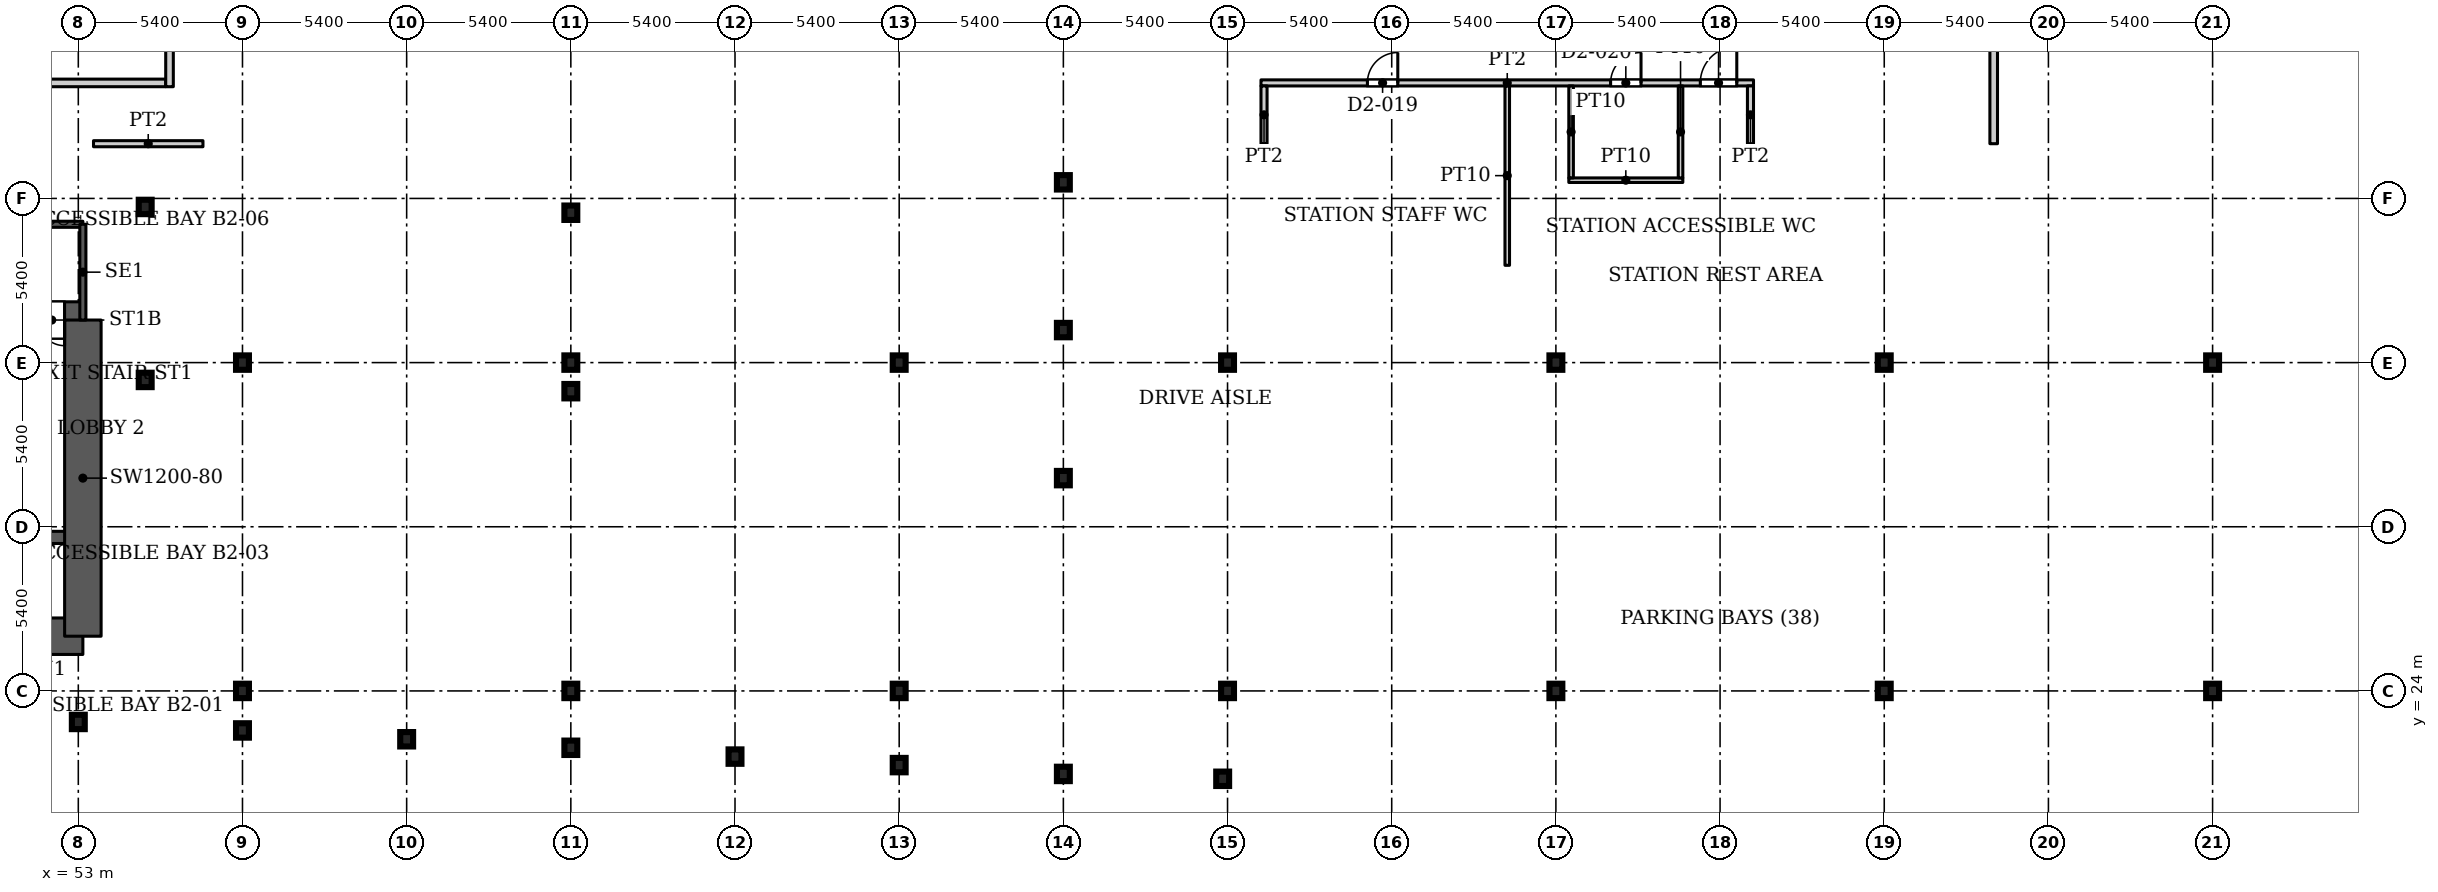
"""IFC4 building model, lengths in metres.
Left out: names, types, materials, properties, quantities, classifications, styles, units other than length and angle.
Written with IfcOpenShell. Run it as: python <this file> out.ifc"""

import sys

from ifc_helpers import new_model, si_unit, direction, frame, frame_2d, origin, origin_2d, place, context, subcontext, project, spatial, rectangle, i_section, extrude, source, transform, mapped, element, fill, save


model = new_model("IFC4")
c1 = context("Model", 3, precision=1e-05, world=origin(), true_north=direction((0.0, 1.0)))
c2 = subcontext(c1, "Body", "Model", "MODEL_VIEW")
j1 = project(units=[si_unit("LENGTHUNIT", "METRE"), si_unit("PLANEANGLEUNIT", "RADIAN")], contexts=[c1])
p1 = place(None, origin())
s1 = spatial("IfcSite", under=j1, at=p1, CompositionType="ELEMENT")
p2 = place(p1, origin())
s2 = spatial("IfcBuilding", under=s1, at=p2, CompositionType="ELEMENT")
p3 = place(p2, frame((0.0, 0.0, -10.0)))
s3 = spatial("IfcBuildingStorey", under=s2, at=p3, CompositionType="ELEMENT", Elevation=-10.0)
for number, where, z_axis, x_axis in (
    (1, (58.4, 24.0, 0.0), (0.0, 0.0, 1.0), (1.0, 0.0, 0.0)),
    (2, (69.2, 24.0, 0.0), (0.0, 0.0, 1.0), (1.0, 0.0, 0.0)),
    (3, (80.0, 24.0, 0.0), (0.0, 0.0, 1.0), (1.0, 0.0, 0.0)),
    (4, (90.8, 24.0, 0.0), (0.0, 0.0, 1.0), (1.0, 0.0, 0.0)),
    (5, (101.6, 24.0, 0.0), (0.0, 0.0, 1.0), (1.0, 0.0, 0.0)),
    (6, (112.4, 24.0, 0.0), (0.0, 0.0, 1.0), (1.0, 0.0, 0.0)),
    (7, (123.2, 24.0, 0.0), (0.0, 0.0, 1.0), (1.0, 0.0, 0.0)),
    (8, (58.4, 34.8, 0.0), (0.0, 0.0, 1.0), (1.0, 0.0, 0.0)),
    (9, (69.2, 34.8, 0.0), (0.0, 0.0, 1.0), (1.0, 0.0, 0.0)),
    (10, (80.0, 34.8, 0.0), (0.0, 0.0, 1.0), (1.0, 0.0, 0.0)),
    (11, (90.8, 34.8, 0.0), (0.0, 0.0, 1.0), (1.0, 0.0, 0.0)),
    (12, (101.6, 34.8, 0.0), (0.0, 0.0, 1.0), (1.0, 0.0, 0.0)),
    (13, (112.4, 34.8, 0.0), (0.0, 0.0, 1.0), (1.0, 0.0, 0.0)),
    (14, (123.2, 34.8, 0.0), (0.0, 0.0, 1.0), (1.0, 0.0, 0.0)),
    (15, (90.64, 21.11, 0.0), (0.0, 0.0, 1.0), (1.0, 0.0, 0.0)),
    (16, (85.4, 21.27, 0.0), (0.0, 0.0, 1.0), (1.0, 0.0, 0.0)),
    (17, (80.0, 21.56, 0.0), (0.0, 0.0, 1.0), (1.0, 0.0, 0.0)),
    (18, (74.6, 21.84, 0.0), (0.0, 0.0, 1.0), (1.0, 0.0, 0.0)),
    (19, (69.2, 22.13, 0.0), (0.0, 0.0, 1.0), (1.0, 0.0, 0.0)),
    (20, (63.8, 22.41, 0.0), (0.0, 0.0, 1.0), (1.0, 0.0, 0.0)),
    (21, (58.4, 22.7, 0.0), (0.0, 0.0, 1.0), (1.0, 0.0, 0.0)),
    (22, (53.0, 22.98, 0.0), (0.0, 0.0, 1.0), (1.0, 0.0, 0.0)),
    (23, (85.4, 31.0, 0.0), (0.0, 0.0, 1.0), (1.0, 0.0, 0.0)),
    (24, (69.2, 33.86, 0.0), (0.0, 0.0, 1.0), (1.0, 0.0, 0.0)),
    (25, (55.2, 34.23, 0.0), (0.0, 0.0, 1.0), (1.0, 0.0, 0.0)),
    (26, (85.4, 35.87, 0.0), (0.0, 0.0, 1.0), (1.0, 0.0, 0.0)),
    (27, (69.2, 39.73, 0.0), (0.0, 0.0, 1.0), (1.0, 0.0, 0.0)),
    (28, (55.2, 39.92, 0.0), (0.0, 0.0, 1.0), (1.0, 0.0, 0.0)),
    (29, (85.4, 40.73, 0.0), (0.0, 0.0, 1.0), (1.0, 0.0, 0.0)),
):
    element("IfcColumn", number, at=place(p3, frame(where, z_axis=z_axis, x_axis=x_axis)), inside=s3, PredefinedType="COLUMN", context=c2, shape_type="SweptSolid", body=[
        extrude(i_section(OverallWidth=0.424, OverallDepth=0.474, WebThickness=0.048, FlangeThickness=0.077, FilletRadius=0.014, at=origin_2d()), origin(), (0.0, 0.0, 1.0), 5.0),
    ])
p4 = place(p3, frame((34.75, 25.8, 0.0), z_axis=(0.0, 0.0, 1.0), x_axis=(1.0, 0.0, 0.0)))
e30 = element("IfcWall", 30, at=p4, inside=s3, PredefinedType="SHEAR", context=c2, shape_type="SweptSolid", body=[
    extrude(rectangle(XDim=18.4, YDim=1.2, at=frame_2d((9.2, 0.0))), origin(), (0.0, 0.0, 1.0), 5.0),
])
p5 = place(p3, frame((34.75, 29.05, 0.0), z_axis=(0.0, 0.0, 1.0), x_axis=(1.0, 0.0, 0.0)))
e31 = element("IfcWall", 31, at=p5, inside=s3, PredefinedType="SHEAR", context=c2, shape_type="SweptSolid", body=[
    extrude(rectangle(XDim=18.4, YDim=0.4, at=frame_2d((9.2, 0.0))), origin(), (0.0, 0.0, 1.0), 5.0),
])
p6 = place(p5, frame((15.125, 0.0, 0.0)))
e32 = element("IfcOpeningElement", 32, at=p6, cuts=e31, PredefinedType="OPENING", context=c2, shape_type="SweptSolid", body=[
    extrude(rectangle(XDim=1.1, YDim=2.2, at=frame_2d((0.55, 1.1))), frame((0.0, 0.21, 0.0), z_axis=(0.0, -1.0, 0.0), x_axis=(1.0, 0.0, 0.0)), (0.0, 0.0, 1.0), 0.42),
])
p7 = place(p3, frame((34.75, 36.2, 0.0), z_axis=(0.0, 0.0, 1.0), x_axis=(1.0, 0.0, 0.0)))
e33 = element("IfcWall", 33, at=p7, inside=s3, PredefinedType="SHEAR", context=c2, shape_type="SweptSolid", body=[
    extrude(rectangle(XDim=18.4, YDim=1.2, at=frame_2d((9.2, 0.0))), origin(), (0.0, 0.0, 1.0), 5.0),
])
p8 = place(p7, frame((16.955, 0.0, 0.0)))
e34 = element("IfcOpeningElement", 34, at=p8, cuts=e33, PredefinedType="OPENING", context=c2, shape_type="SweptSolid", body=[
    extrude(rectangle(XDim=0.843, YDim=2.2, at=frame_2d((0.421, 1.1))), frame((0.0, 0.61, 0.0), z_axis=(0.0, -1.0, 0.0), x_axis=(1.0, 0.0, 0.0)), (0.0, 0.0, 1.0), 1.22),
])
p9 = place(p3, frame((53.15, 25.8, 0.0), z_axis=(0.0, 0.0, 1.0), x_axis=(0.0, 1.0, 0.0)))
e35 = element("IfcWall", 35, at=p9, inside=s3, PredefinedType="SHEAR", context=c2, shape_type="SweptSolid", body=[
    extrude(rectangle(XDim=10.4, YDim=1.2, at=frame_2d((5.2, 0.0))), origin(), (0.0, 0.0, 1.0), 5.0),
])
p10 = place(p3, frame((43.99, 39.35, 0.0), z_axis=(0.0, 0.0, 1.0), x_axis=(1.0, 0.0, 0.0)))
e36 = element("IfcWall", 36, at=p10, inside=s3, PredefinedType="SHEAR", context=c2, shape_type="SweptSolid", body=[
    extrude(rectangle(XDim=9.16, YDim=0.2, at=frame_2d((4.58, 0.0))), origin(), (0.0, 0.0, 1.0), 5.0),
])
p11 = place(p3, frame((53.15, 36.2, 0.0), z_axis=(0.0, 0.0, 1.0), x_axis=(0.0, 1.0, 0.0)))
e37 = element("IfcWall", 37, at=p11, inside=s3, PredefinedType="SHEAR", context=c2, shape_type="SweptSolid", body=[
    extrude(rectangle(XDim=3.15, YDim=0.2, at=frame_2d((1.575, 0.0))), origin(), (0.0, 0.0, 1.0), 5.0),
])
p12 = place(p3, frame((44.125, 44.0, 0.0), z_axis=(0.0, 0.0, 1.0), x_axis=(1.0, 0.0, 0.0)))
e38 = element("IfcWall", 38, at=p12, inside=s3, PredefinedType="PARTITIONING", context=c2, shape_type="SweptSolid", body=[
    extrude(rectangle(XDim=11.75, YDim=0.25, at=frame_2d((5.875, 0.0))), origin(), (0.0, 0.0, 1.0), 4.58),
])
p13 = place(p3, frame((53.5, 42.0, 0.0), z_axis=(0.0, 0.0, 1.0), x_axis=(1.0, 0.0, 0.0)))
e39 = element("IfcWall", 39, at=p13, inside=s3, PredefinedType="PARTITIONING", context=c2, shape_type="SweptSolid", body=[
    extrude(rectangle(XDim=3.6, YDim=0.2, at=frame_2d((1.8, 0.0))), origin(), (0.0, 0.0, 1.0), 4.58),
])
p14 = place(p3, frame((56.0, 43.875, 0.0), z_axis=(0.0, 0.0, 1.0), x_axis=(0.0, 1.0, 0.0)))
e40 = element("IfcWall", 40, at=p14, inside=s3, PredefinedType="PARTITIONING", context=c2, shape_type="SweptSolid", body=[
    extrude(rectangle(XDim=20.125, YDim=0.25, at=frame_2d((10.062, 0.0))), origin(), (0.0, 0.0, 1.0), 4.58),
])
p15 = place(p3, frame((91.9, 44.0, 0.0), z_axis=(0.0, 0.0, 1.0), x_axis=(1.0, 0.0, 0.0)))
e41 = element("IfcWall", 41, at=p15, inside=s3, PredefinedType="PARTITIONING", context=c2, shape_type="SweptSolid", body=[
    extrude(rectangle(XDim=16.2, YDim=0.2, at=frame_2d((8.1, 0.0))), origin(), (0.0, 0.0, 1.0), 4.58),
])
p16 = place(p15, frame((3.5, 0.0, 0.0)))
e42 = element("IfcOpeningElement", 42, at=p16, cuts=e41, PredefinedType="OPENING", context=c2, shape_type="SweptSolid", body=[
    extrude(rectangle(XDim=1.0, YDim=2.1, at=frame_2d((0.5, 1.05))), frame((0.0, 0.11, 0.0), z_axis=(0.0, -1.0, 0.0), x_axis=(1.0, 0.0, 0.0)), (0.0, 0.0, 1.0), 0.22),
])
p17 = place(p15, frame((11.5, 0.0, 0.0)))
e43 = element("IfcOpeningElement", 43, at=p17, cuts=e41, PredefinedType="OPENING", context=c2, shape_type="SweptSolid", body=[
    extrude(rectangle(XDim=1.0, YDim=2.1, at=frame_2d((0.5, 1.05))), frame((0.0, 0.11, 0.0), z_axis=(0.0, -1.0, 0.0), x_axis=(1.0, 0.0, 0.0)), (0.0, 0.0, 1.0), 0.22),
])
p18 = place(p15, frame((14.45, 0.0, 0.0)))
e44 = element("IfcOpeningElement", 44, at=p18, cuts=e41, PredefinedType="OPENING", context=c2, shape_type="SweptSolid", body=[
    extrude(rectangle(XDim=1.2, YDim=2.1, at=frame_2d((0.6, 1.05))), frame((0.0, 0.11, 0.0), z_axis=(0.0, -1.0, 0.0), x_axis=(1.0, 0.0, 0.0)), (0.0, 0.0, 1.0), 0.22),
])
p19 = place(p3, frame((92.0, 42.0, 0.0), z_axis=(0.0, 0.0, 1.0), x_axis=(0.0, 1.0, 0.0)))
e45 = element("IfcWall", 45, at=p19, inside=s3, PredefinedType="PARTITIONING", context=c2, shape_type="SweptSolid", body=[
    extrude(rectangle(XDim=1.9, YDim=0.2, at=frame_2d((0.95, 0.0))), origin(), (0.0, 0.0, 1.0), 4.58),
])
p20 = place(p3, frame((100.0, 38.0, 0.0), z_axis=(0.0, 0.0, 1.0), x_axis=(0.0, 1.0, 0.0)))
e46 = element("IfcWall", 46, at=p20, inside=s3, PredefinedType="PARTITIONING", context=c2, shape_type="SweptSolid", body=[
    extrude(rectangle(XDim=5.9, YDim=0.15, at=frame_2d((2.95, 0.0))), origin(), (0.0, 0.0, 1.0), 4.58),
])
p21 = place(p3, frame((102.025, 40.8, 0.0), z_axis=(0.0, 0.0, 1.0), x_axis=(1.0, 0.0, 0.0)))
e47 = element("IfcWall", 47, at=p21, inside=s3, PredefinedType="PARTITIONING", context=c2, shape_type="SweptSolid", body=[
    extrude(rectangle(XDim=3.75, YDim=0.15, at=frame_2d((1.875, 0.0))), origin(), (0.0, 0.0, 1.0), 4.58),
])
for number, where, z_axis, x_axis in (
    (48, (102.1, 40.875, 0.0), (0.0, 0.0, 1.0), (0.0, 1.0, 0.0)),
    (49, (105.7, 40.875, 0.0), (0.0, 0.0, 1.0), (0.0, 1.0, 0.0)),
):
    element("IfcWall", number, at=place(p3, frame(where, z_axis=z_axis, x_axis=x_axis)), inside=s3, PredefinedType="PARTITIONING", context=c2, shape_type="SweptSolid", body=[
        extrude(rectangle(XDim=3.025, YDim=0.15, at=frame_2d((1.512, 0.0))), origin(), (0.0, 0.0, 1.0), 4.58),
    ])
p22 = place(p3, frame((108.0, 42.0, 0.0), z_axis=(0.0, 0.0, 1.0), x_axis=(0.0, 1.0, 0.0)))
e50 = element("IfcWall", 50, at=p22, inside=s3, PredefinedType="PARTITIONING", context=c2, shape_type="SweptSolid", body=[
    extrude(rectangle(XDim=1.9, YDim=0.2, at=frame_2d((0.95, 0.0))), origin(), (0.0, 0.0, 1.0), 4.58),
])
p23 = place(p3, frame((116.0, 42.0, 0.0), z_axis=(0.0, 0.0, 1.0), x_axis=(0.0, 1.0, 0.0)))
e51 = element("IfcWall", 51, at=p23, inside=s3, PredefinedType="PARTITIONING", context=c2, shape_type="SweptSolid", body=[
    extrude(rectangle(XDim=34.0, YDim=0.25, at=frame_2d((17.0, 0.0))), origin(), (0.0, 0.0, 1.0), 4.58),
])
p24 = place(p23, frame((9.4, 0.0, 0.0)))
e52 = element("IfcOpeningElement", 52, at=p24, cuts=e51, PredefinedType="OPENING", context=c2, shape_type="SweptSolid", body=[
    extrude(rectangle(XDim=1.2, YDim=2.1, at=frame_2d((0.6, 1.05))), frame((0.0, 0.135, 0.0), z_axis=(0.0, -1.0, 0.0), x_axis=(1.0, 0.0, 0.0)), (0.0, 0.0, 1.0), 0.27),
])
p25 = place(p23, frame((25.4, 0.0, 0.0)))
e53 = element("IfcOpeningElement", 53, at=p25, cuts=e51, PredefinedType="OPENING", context=c2, shape_type="SweptSolid", body=[
    extrude(rectangle(XDim=1.2, YDim=2.1, at=frame_2d((0.6, 1.05))), frame((0.0, 0.135, 0.0), z_axis=(0.0, -1.0, 0.0), x_axis=(1.0, 0.0, 0.0)), (0.0, 0.0, 1.0), 0.27),
])
m1 = source(origin(), c2, "Body", "SweptSolid", [
    extrude(rectangle(XDim=0.843, YDim=2.2, at=frame_2d((0.421, 1.1))), frame((0.0, 0.025, 0.0), z_axis=(0.0, -1.0, 0.0), x_axis=(1.0, 0.0, 0.0)), (0.0, 0.0, 1.0), 0.05),
])
p26 = place(p8, origin())
e54 = element("IfcDoor", 54, at=p26, inside=s3, OperationType="SINGLE_SWING_RIGHT", PredefinedType="DOOR", context=c2, shape_type="MappedRepresentation", body=[
    mapped(m1, transform((0.0, 0.0, 0.0), x_axis=(1.0, 0.0, 0.0), y_axis=(0.0, 1.0, 0.0), z_axis=(0.0, 0.0, 1.0), scale=1.0)),
])
fill(e34, e54)
m2 = source(origin(), c2, "Body", "SweptSolid", [
    extrude(rectangle(XDim=1.0, YDim=2.1, at=frame_2d((0.5, 1.05))), frame((0.0, 0.025, 0.0), z_axis=(0.0, -1.0, 0.0), x_axis=(1.0, 0.0, 0.0)), (0.0, 0.0, 1.0), 0.05),
])
p27 = place(p16, origin())
e55 = element("IfcDoor", 55, at=p27, inside=s3, OperationType="SINGLE_SWING_LEFT", PredefinedType="DOOR", context=c2, shape_type="MappedRepresentation", body=[
    mapped(m2, transform((0.0, 0.0, 0.0), x_axis=(1.0, 0.0, 0.0), y_axis=(0.0, 1.0, 0.0), z_axis=(0.0, 0.0, 1.0), scale=1.0)),
])
fill(e42, e55)
p28 = place(p17, origin())
e56 = element("IfcDoor", 56, at=p28, inside=s3, OperationType="SINGLE_SWING_LEFT", PredefinedType="DOOR", context=c2, shape_type="MappedRepresentation", body=[
    mapped(m2, transform((0.0, 0.0, 0.0), x_axis=(1.0, 0.0, 0.0), y_axis=(0.0, 1.0, 0.0), z_axis=(0.0, 0.0, 1.0), scale=1.0)),
])
fill(e43, e56)
m3 = source(origin(), c2, "Body", "SweptSolid", [
    extrude(rectangle(XDim=1.2, YDim=2.1, at=frame_2d((0.6, 1.05))), frame((0.0, 0.025, 0.0), z_axis=(0.0, -1.0, 0.0), x_axis=(1.0, 0.0, 0.0)), (0.0, 0.0, 1.0), 0.05),
])
p29 = place(p18, origin())
e57 = element("IfcDoor", 57, at=p29, inside=s3, OperationType="SINGLE_SWING_LEFT", PredefinedType="DOOR", context=c2, shape_type="MappedRepresentation", body=[
    mapped(m3, transform((0.0, 0.0, 0.0), x_axis=(1.0, 0.0, 0.0), y_axis=(0.0, 1.0, 0.0), z_axis=(0.0, 0.0, 1.0), scale=1.0)),
])
fill(e44, e57)
save(model, sys.argv[1])
